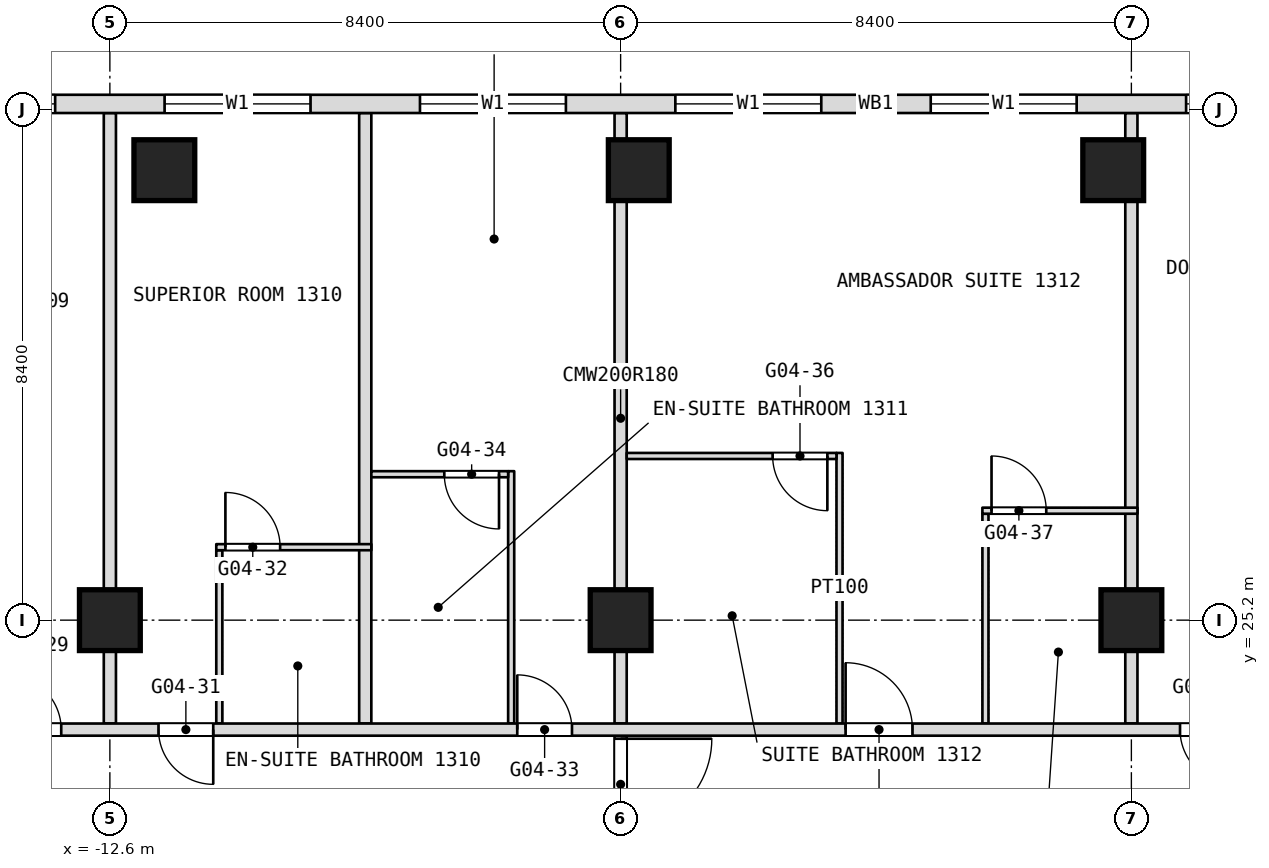
"""IFC4 building model, lengths in metres.
Left out: names, types, materials, properties, quantities, classifications, styles, units other than length and angle.
Written with IfcOpenShell. Run it as: python <this file> out.ifc"""

import sys

from ifc_helpers import new_model, si_unit, direction, frame, frame_2d, origin, origin_2d, place, context, subcontext, project, spatial, rectangle, extrude, element, fill, save


model = new_model("IFC4")
c1 = context("Model", 3, precision=1e-05, world=origin(), true_north=direction((0.0, 1.0)))
c2 = subcontext(c1, "Body", "Model", "MODEL_VIEW")
j1 = project(units=[si_unit("LENGTHUNIT", "METRE"), si_unit("PLANEANGLEUNIT", "RADIAN")], contexts=[c1])
p1 = place(None, origin())
s1 = spatial("IfcSite", under=j1, at=p1, CompositionType="ELEMENT")
p2 = place(p1, origin())
s2 = spatial("IfcBuilding", under=s1, at=p2, CompositionType="ELEMENT")
p3 = place(p2, frame((0.0, 0.0, 61.7)))
s3 = spatial("IfcBuildingStorey", under=s2, at=p3, CompositionType="ELEMENT", Elevation=61.7)
for number, where, z_axis, x_axis in (
    (1, (-12.6, 25.2, 0.0), (0.0, 0.0, 1.0), (1.0, 0.0, 0.0)),
    (2, (-4.2, 25.2, 0.0), (0.0, 0.0, 1.0), (1.0, 0.0, 0.0)),
    (3, (4.2, 25.2, 0.0), (0.0, 0.0, 1.0), (1.0, 0.0, 0.0)),
    (4, (-11.704, 32.6, 0.0), (0.0, 0.0, 1.0), (1.0, 0.0, 0.0)),
    (5, (-3.901, 32.6, 0.0), (0.0, 0.0, 1.0), (1.0, 0.0, 0.0)),
    (6, (3.901, 32.6, 0.0), (0.0, 0.0, 1.0), (1.0, 0.0, 0.0)),
):
    element("IfcColumn", number, at=place(p3, frame(where, z_axis=z_axis, x_axis=x_axis)), inside=s3, PredefinedType="COLUMN", context=c2, shape_type="SweptSolid", body=[
        extrude(rectangle(XDim=1.0, YDim=1.0, at=origin_2d()), origin(), (0.0, 0.0, 1.0), 3.6),
    ])
p4 = place(p3, frame((4.2, 23.5, 0.0), z_axis=(0.0, 0.0, 1.0), x_axis=(0.0, 1.0, 0.0)))
e7 = element("IfcWall", 7, at=p4, inside=s3, PredefinedType="PARTITIONING", context=c2, shape_type="SweptSolid", body=[
    extrude(rectangle(XDim=10.04, YDim=0.2, at=frame_2d((5.02, 0.0))), origin(), (0.0, 0.0, 1.0), 3.34),
])
p5 = place(p3, frame((1.8, 23.5, 0.0), z_axis=(0.0, 0.0, 1.0), x_axis=(0.0, 1.0, 0.0)))
e8 = element("IfcWall", 8, at=p5, inside=s3, PredefinedType="PARTITIONING", context=c2, shape_type="SweptSolid", body=[
    extrude(rectangle(XDim=3.45, YDim=0.1, at=frame_2d((1.725, 0.0))), origin(), (0.0, 0.0, 1.0), 3.34),
])
p6 = place(p3, frame((-0.6, 23.5, 0.0), z_axis=(0.0, 0.0, 1.0), x_axis=(0.0, 1.0, 0.0)))
e9 = element("IfcWall", 9, at=p6, inside=s3, PredefinedType="PARTITIONING", context=c2, shape_type="SweptSolid", body=[
    extrude(rectangle(XDim=4.45, YDim=0.1, at=frame_2d((2.225, 0.0))), origin(), (0.0, 0.0, 1.0), 3.34),
])
p7 = place(p3, frame((-4.2, 16.8, 0.0), z_axis=(0.0, 0.0, 1.0), x_axis=(0.0, 1.0, 0.0)))
e10 = element("IfcWall", 10, at=p7, inside=s3, PredefinedType="PARTITIONING", context=c2, shape_type="SweptSolid", body=[
    extrude(rectangle(XDim=6.7, YDim=0.2, at=frame_2d((3.35, 0.0))), origin(), (0.0, 0.0, 1.0), 3.34),
])
p8 = place(p7, frame((0.15, 0.0, 0.0)))
e11 = element("IfcOpeningElement", 11, at=p8, cuts=e10, PredefinedType="OPENING", context=c2, shape_type="SweptSolid", body=[
    extrude(rectangle(XDim=1.5, YDim=2.1, at=frame_2d((0.75, 1.05))), frame((0.0, 0.1, 0.0), z_axis=(0.0, -1.0, 0.0), x_axis=(1.0, 0.0, 0.0)), (0.0, 0.0, 1.0), 0.2),
])
p9 = place(p7, frame((4.95, 0.0, 0.0)))
e12 = element("IfcOpeningElement", 12, at=p9, cuts=e10, PredefinedType="OPENING", context=c2, shape_type="SweptSolid", body=[
    extrude(rectangle(XDim=1.5, YDim=2.1, at=frame_2d((0.75, 1.05))), frame((0.0, 0.1, 0.0), z_axis=(0.0, -1.0, 0.0), x_axis=(1.0, 0.0, 0.0)), (0.0, 0.0, 1.0), 0.2),
])
p10 = place(p3, frame((-4.2, 23.5, 0.0), z_axis=(0.0, 0.0, 1.0), x_axis=(0.0, 1.0, 0.0)))
e13 = element("IfcWall", 13, at=p10, inside=s3, PredefinedType="PARTITIONING", context=c2, shape_type="SweptSolid", body=[
    extrude(rectangle(XDim=10.04, YDim=0.2, at=frame_2d((5.02, 0.0))), origin(), (0.0, 0.0, 1.0), 3.34),
])
p11 = place(p3, frame((-6.0, 23.5, 0.0), z_axis=(0.0, 0.0, 1.0), x_axis=(0.0, 1.0, 0.0)))
e14 = element("IfcWall", 14, at=p11, inside=s3, PredefinedType="PARTITIONING", context=c2, shape_type="SweptSolid", body=[
    extrude(rectangle(XDim=4.15, YDim=0.1, at=frame_2d((2.075, 0.0))), origin(), (0.0, 0.0, 1.0), 3.34),
])
p12 = place(p3, frame((-8.4, 23.5, 0.0), z_axis=(0.0, 0.0, 1.0), x_axis=(0.0, 1.0, 0.0)))
e15 = element("IfcWall", 15, at=p12, inside=s3, PredefinedType="PARTITIONING", context=c2, shape_type="SweptSolid", body=[
    extrude(rectangle(XDim=10.04, YDim=0.2, at=frame_2d((5.02, 0.0))), origin(), (0.0, 0.0, 1.0), 3.34),
])
p13 = place(p3, frame((-10.8, 23.5, 0.0), z_axis=(0.0, 0.0, 1.0), x_axis=(0.0, 1.0, 0.0)))
e16 = element("IfcWall", 16, at=p13, inside=s3, PredefinedType="PARTITIONING", context=c2, shape_type="SweptSolid", body=[
    extrude(rectangle(XDim=2.85, YDim=0.1, at=frame_2d((1.425, 0.0))), origin(), (0.0, 0.0, 1.0), 3.34),
])
p14 = place(p3, frame((-12.6, 23.5, 0.0), z_axis=(0.0, 0.0, 1.0), x_axis=(0.0, 1.0, 0.0)))
e17 = element("IfcWall", 17, at=p14, inside=s3, PredefinedType="PARTITIONING", context=c2, shape_type="SweptSolid", body=[
    extrude(rectangle(XDim=10.04, YDim=0.2, at=frame_2d((5.02, 0.0))), origin(), (0.0, 0.0, 1.0), 3.34),
])
p15 = place(p3, frame((-16.7, 23.4, 0.0), z_axis=(0.0, 0.0, 1.0), x_axis=(1.0, 0.0, 0.0)))
e18 = element("IfcWall", 18, at=p15, inside=s3, PredefinedType="PARTITIONING", context=c2, shape_type="SweptSolid", body=[
    extrude(rectangle(XDim=23.4, YDim=0.2, at=frame_2d((11.7, 0.0))), origin(), (0.0, 0.0, 1.0), 3.34),
])
p16 = place(p15, frame((2.4, 0.0, 0.0)))
e19 = element("IfcOpeningElement", 19, at=p16, cuts=e18, PredefinedType="OPENING", context=c2, shape_type="SweptSolid", body=[
    extrude(rectangle(XDim=0.9, YDim=2.1, at=frame_2d((0.45, 1.05))), frame((0.0, 0.1, 0.0), z_axis=(0.0, -1.0, 0.0), x_axis=(1.0, 0.0, 0.0)), (0.0, 0.0, 1.0), 0.2),
])
p17 = place(p15, frame((4.9, 0.0, 0.0)))
e20 = element("IfcOpeningElement", 20, at=p17, cuts=e18, PredefinedType="OPENING", context=c2, shape_type="SweptSolid", body=[
    extrude(rectangle(XDim=0.9, YDim=2.1, at=frame_2d((0.45, 1.05))), frame((0.0, 0.1, 0.0), z_axis=(0.0, -1.0, 0.0), x_axis=(1.0, 0.0, 0.0)), (0.0, 0.0, 1.0), 0.2),
])
p18 = place(p15, frame((10.8, 0.0, 0.0)))
e21 = element("IfcOpeningElement", 21, at=p18, cuts=e18, PredefinedType="OPENING", context=c2, shape_type="SweptSolid", body=[
    extrude(rectangle(XDim=0.9, YDim=2.1, at=frame_2d((0.45, 1.05))), frame((0.0, 0.1, 0.0), z_axis=(0.0, -1.0, 0.0), x_axis=(1.0, 0.0, 0.0)), (0.0, 0.0, 1.0), 0.2),
])
p19 = place(p15, frame((16.2, 0.0, 0.0)))
e22 = element("IfcOpeningElement", 22, at=p19, cuts=e18, PredefinedType="OPENING", context=c2, shape_type="SweptSolid", body=[
    extrude(rectangle(XDim=1.1, YDim=2.1, at=frame_2d((0.55, 1.05))), frame((0.0, 0.1, 0.0), z_axis=(0.0, -1.0, 0.0), x_axis=(1.0, 0.0, 0.0)), (0.0, 0.0, 1.0), 0.2),
])
p20 = place(p15, frame((21.7, 0.0, 0.0)))
e23 = element("IfcOpeningElement", 23, at=p20, cuts=e18, PredefinedType="OPENING", context=c2, shape_type="SweptSolid", body=[
    extrude(rectangle(XDim=0.9, YDim=2.1, at=frame_2d((0.45, 1.05))), frame((0.0, 0.1, 0.0), z_axis=(0.0, -1.0, 0.0), x_axis=(1.0, 0.0, 0.0)), (0.0, 0.0, 1.0), 0.2),
])
p21 = place(p3, frame((-10.85, 26.4, 0.0), z_axis=(0.0, 0.0, 1.0), x_axis=(1.0, 0.0, 0.0)))
e24 = element("IfcWall", 24, at=p21, inside=s3, PredefinedType="PARTITIONING", context=c2, shape_type="SweptSolid", body=[
    extrude(rectangle(XDim=2.55, YDim=0.1, at=frame_2d((1.275, 0.0))), origin(), (0.0, 0.0, 1.0), 3.34),
])
p22 = place(p21, frame((0.15, 0.0, 0.0)))
e25 = element("IfcOpeningElement", 25, at=p22, cuts=e24, PredefinedType="OPENING", context=c2, shape_type="SweptSolid", body=[
    extrude(rectangle(XDim=0.9, YDim=2.1, at=frame_2d((0.45, 1.05))), frame((0.0, 0.05, 0.0), z_axis=(0.0, -1.0, 0.0), x_axis=(1.0, 0.0, 0.0)), (0.0, 0.0, 1.0), 0.1),
])
p23 = place(p3, frame((1.75, 27.0, 0.0), z_axis=(0.0, 0.0, 1.0), x_axis=(1.0, 0.0, 0.0)))
e26 = element("IfcWall", 26, at=p23, inside=s3, PredefinedType="PARTITIONING", context=c2, shape_type="SweptSolid", body=[
    extrude(rectangle(XDim=2.55, YDim=0.1, at=frame_2d((1.275, 0.0))), origin(), (0.0, 0.0, 1.0), 3.34),
])
p24 = place(p23, frame((0.15, 0.0, 0.0)))
e27 = element("IfcOpeningElement", 27, at=p24, cuts=e26, PredefinedType="OPENING", context=c2, shape_type="SweptSolid", body=[
    extrude(rectangle(XDim=0.9, YDim=2.1, at=frame_2d((0.45, 1.05))), frame((0.0, 0.05, 0.0), z_axis=(0.0, -1.0, 0.0), x_axis=(1.0, 0.0, 0.0)), (0.0, 0.0, 1.0), 0.1),
])
p25 = place(p3, frame((-8.3, 27.6, 0.0), z_axis=(0.0, 0.0, 1.0), x_axis=(1.0, 0.0, 0.0)))
e28 = element("IfcWall", 28, at=p25, inside=s3, PredefinedType="PARTITIONING", context=c2, shape_type="SweptSolid", body=[
    extrude(rectangle(XDim=2.25, YDim=0.1, at=frame_2d((1.125, 0.0))), origin(), (0.0, 0.0, 1.0), 3.34),
])
p26 = place(p25, frame((1.2, 0.0, 0.0)))
e29 = element("IfcOpeningElement", 29, at=p26, cuts=e28, PredefinedType="OPENING", context=c2, shape_type="SweptSolid", body=[
    extrude(rectangle(XDim=0.9, YDim=2.1, at=frame_2d((0.45, 1.05))), frame((0.0, 0.05, 0.0), z_axis=(0.0, -1.0, 0.0), x_axis=(1.0, 0.0, 0.0)), (0.0, 0.0, 1.0), 0.1),
])
p27 = place(p3, frame((-4.1, 27.9, 0.0), z_axis=(0.0, 0.0, 1.0), x_axis=(1.0, 0.0, 0.0)))
e30 = element("IfcWall", 30, at=p27, inside=s3, PredefinedType="PARTITIONING", context=c2, shape_type="SweptSolid", body=[
    extrude(rectangle(XDim=3.45, YDim=0.1, at=frame_2d((1.725, 0.0))), origin(), (0.0, 0.0, 1.0), 3.34),
])
p28 = place(p27, frame((2.4, 0.0, 0.0)))
e31 = element("IfcOpeningElement", 31, at=p28, cuts=e30, PredefinedType="OPENING", context=c2, shape_type="SweptSolid", body=[
    extrude(rectangle(XDim=0.9, YDim=2.1, at=frame_2d((0.45, 1.05))), frame((0.0, 0.05, 0.0), z_axis=(0.0, -1.0, 0.0), x_axis=(1.0, 0.0, 0.0)), (0.0, 0.0, 1.0), 0.1),
])
p29 = place(p3, frame((23.406, 33.69, 0.0), z_axis=(0.0, 0.0, 1.0), x_axis=(-1.0, 0.0, 0.0)))
e32 = element("IfcWall", 32, at=p29, inside=s3, PredefinedType="NOTDEFINED", context=c2, shape_type="SweptSolid", body=[
    extrude(rectangle(XDim=46.812, YDim=0.3, at=frame_2d((23.406, 0.0))), origin(), (0.0, 0.0, 1.0), 3.6),
])
p30 = place(p29, frame((2.186, 0.0, 0.9)))
e33 = element("IfcOpeningElement", 33, at=p30, cuts=e32, PredefinedType="OPENING", context=c2, shape_type="SweptSolid", body=[
    extrude(rectangle(XDim=2.4, YDim=2.1, at=frame_2d((1.2, 1.05))), frame((0.0, 0.15, 0.0), z_axis=(0.0, -1.0, 0.0), x_axis=(1.0, 0.0, 0.0)), (0.0, 0.0, 1.0), 0.3),
])
p31 = place(p29, frame((7.506, 0.0, 0.9)))
e34 = element("IfcOpeningElement", 34, at=p31, cuts=e32, PredefinedType="OPENING", context=c2, shape_type="SweptSolid", body=[
    extrude(rectangle(XDim=2.4, YDim=2.1, at=frame_2d((1.2, 1.05))), frame((0.0, 0.15, 0.0), z_axis=(0.0, -1.0, 0.0), x_axis=(1.0, 0.0, 0.0)), (0.0, 0.0, 1.0), 0.3),
])
p32 = place(p29, frame((11.706, 0.0, 0.9)))
e35 = element("IfcOpeningElement", 35, at=p32, cuts=e32, PredefinedType="OPENING", context=c2, shape_type="SweptSolid", body=[
    extrude(rectangle(XDim=2.4, YDim=2.1, at=frame_2d((1.2, 1.05))), frame((0.0, 0.15, 0.0), z_axis=(0.0, -1.0, 0.0), x_axis=(1.0, 0.0, 0.0)), (0.0, 0.0, 1.0), 0.3),
])
p33 = place(p29, frame((15.906, 0.0, 0.9)))
e36 = element("IfcOpeningElement", 36, at=p33, cuts=e32, PredefinedType="OPENING", context=c2, shape_type="SweptSolid", body=[
    extrude(rectangle(XDim=2.4, YDim=2.1, at=frame_2d((1.2, 1.05))), frame((0.0, 0.15, 0.0), z_axis=(0.0, -1.0, 0.0), x_axis=(1.0, 0.0, 0.0)), (0.0, 0.0, 1.0), 0.3),
])
p34 = place(p29, frame((20.106, 0.0, 0.9)))
e37 = element("IfcOpeningElement", 37, at=p34, cuts=e32, PredefinedType="OPENING", context=c2, shape_type="SweptSolid", body=[
    extrude(rectangle(XDim=2.4, YDim=2.1, at=frame_2d((1.2, 1.05))), frame((0.0, 0.15, 0.0), z_axis=(0.0, -1.0, 0.0), x_axis=(1.0, 0.0, 0.0)), (0.0, 0.0, 1.0), 0.3),
])
p35 = place(p29, frame((24.306, 0.0, 0.9)))
e38 = element("IfcOpeningElement", 38, at=p35, cuts=e32, PredefinedType="OPENING", context=c2, shape_type="SweptSolid", body=[
    extrude(rectangle(XDim=2.4, YDim=2.1, at=frame_2d((1.2, 1.05))), frame((0.0, 0.15, 0.0), z_axis=(0.0, -1.0, 0.0), x_axis=(1.0, 0.0, 0.0)), (0.0, 0.0, 1.0), 0.3),
])
p36 = place(p29, frame((28.506, 0.0, 0.9)))
e39 = element("IfcOpeningElement", 39, at=p36, cuts=e32, PredefinedType="OPENING", context=c2, shape_type="SweptSolid", body=[
    extrude(rectangle(XDim=2.4, YDim=2.1, at=frame_2d((1.2, 1.05))), frame((0.0, 0.15, 0.0), z_axis=(0.0, -1.0, 0.0), x_axis=(1.0, 0.0, 0.0)), (0.0, 0.0, 1.0), 0.3),
])
p37 = place(p29, frame((32.706, 0.0, 0.9)))
e40 = element("IfcOpeningElement", 40, at=p37, cuts=e32, PredefinedType="OPENING", context=c2, shape_type="SweptSolid", body=[
    extrude(rectangle(XDim=2.4, YDim=2.1, at=frame_2d((1.2, 1.05))), frame((0.0, 0.15, 0.0), z_axis=(0.0, -1.0, 0.0), x_axis=(1.0, 0.0, 0.0)), (0.0, 0.0, 1.0), 0.3),
])
p38 = place(p29, frame((36.906, 0.0, 0.9)))
e41 = element("IfcOpeningElement", 41, at=p38, cuts=e32, PredefinedType="OPENING", context=c2, shape_type="SweptSolid", body=[
    extrude(rectangle(XDim=2.4, YDim=2.1, at=frame_2d((1.2, 1.05))), frame((0.0, 0.15, 0.0), z_axis=(0.0, -1.0, 0.0), x_axis=(1.0, 0.0, 0.0)), (0.0, 0.0, 1.0), 0.3),
])
p39 = place(p29, frame((42.226, 0.0, 0.9)))
e42 = element("IfcOpeningElement", 42, at=p39, cuts=e32, PredefinedType="OPENING", context=c2, shape_type="SweptSolid", body=[
    extrude(rectangle(XDim=2.4, YDim=2.1, at=frame_2d((1.2, 1.05))), frame((0.0, 0.15, 0.0), z_axis=(0.0, -1.0, 0.0), x_axis=(1.0, 0.0, 0.0)), (0.0, 0.0, 1.0), 0.3),
])
p40 = place(p16, origin())
e43 = element("IfcDoor", 43, at=p40, inside=s3, OperationType="SINGLE_SWING_LEFT", PredefinedType="DOOR", context=c2, shape_type="SweptSolid", body=[
    extrude(rectangle(XDim=0.9, YDim=2.1, at=frame_2d((0.45, 1.05))), frame((0.0, 0.025, 0.0), z_axis=(0.0, -1.0, 0.0), x_axis=(1.0, 0.0, 0.0)), (0.0, 0.0, 1.0), 0.05),
])
fill(e19, e43)
p41 = place(p17, origin())
e44 = element("IfcDoor", 44, at=p41, inside=s3, OperationType="SINGLE_SWING_RIGHT", PredefinedType="DOOR", context=c2, shape_type="SweptSolid", body=[
    extrude(rectangle(XDim=0.9, YDim=2.1, at=frame_2d((0.45, 1.05))), frame((0.0, 0.025, 0.0), z_axis=(0.0, -1.0, 0.0), x_axis=(1.0, 0.0, 0.0)), (0.0, 0.0, 1.0), 0.05),
])
fill(e20, e44)
p42 = place(p18, origin())
e45 = element("IfcDoor", 45, at=p42, inside=s3, OperationType="SINGLE_SWING_LEFT", PredefinedType="DOOR", context=c2, shape_type="SweptSolid", body=[
    extrude(rectangle(XDim=0.9, YDim=2.1, at=frame_2d((0.45, 1.05))), frame((0.0, 0.025, 0.0), z_axis=(0.0, -1.0, 0.0), x_axis=(1.0, 0.0, 0.0)), (0.0, 0.0, 1.0), 0.05),
])
fill(e21, e45)
p43 = place(p19, origin())
e46 = element("IfcDoor", 46, at=p43, inside=s3, OperationType="SINGLE_SWING_LEFT", PredefinedType="DOOR", context=c2, shape_type="SweptSolid", body=[
    extrude(rectangle(XDim=1.1, YDim=2.1, at=frame_2d((0.55, 1.05))), frame((0.0, 0.025, 0.0), z_axis=(0.0, -1.0, 0.0), x_axis=(1.0, 0.0, 0.0)), (0.0, 0.0, 1.0), 0.05),
])
fill(e22, e46)
p44 = place(p20, origin())
e47 = element("IfcDoor", 47, at=p44, inside=s3, OperationType="SINGLE_SWING_RIGHT", PredefinedType="DOOR", context=c2, shape_type="SweptSolid", body=[
    extrude(rectangle(XDim=0.9, YDim=2.1, at=frame_2d((0.45, 1.05))), frame((0.0, 0.025, 0.0), z_axis=(0.0, -1.0, 0.0), x_axis=(1.0, 0.0, 0.0)), (0.0, 0.0, 1.0), 0.05),
])
fill(e23, e47)
p45 = place(p22, origin())
e48 = element("IfcDoor", 48, at=p45, inside=s3, OperationType="SINGLE_SWING_RIGHT", PredefinedType="DOOR", context=c2, shape_type="SweptSolid", body=[
    extrude(rectangle(XDim=0.9, YDim=2.1, at=frame_2d((0.45, 1.05))), frame((0.0, 0.025, 0.0), z_axis=(0.0, -1.0, 0.0), x_axis=(1.0, 0.0, 0.0)), (0.0, 0.0, 1.0), 0.05),
])
fill(e25, e48)
p46 = place(p24, origin())
e49 = element("IfcDoor", 49, at=p46, inside=s3, OperationType="SINGLE_SWING_RIGHT", PredefinedType="DOOR", context=c2, shape_type="SweptSolid", body=[
    extrude(rectangle(XDim=0.9, YDim=2.1, at=frame_2d((0.45, 1.05))), frame((0.0, 0.025, 0.0), z_axis=(0.0, -1.0, 0.0), x_axis=(1.0, 0.0, 0.0)), (0.0, 0.0, 1.0), 0.05),
])
fill(e27, e49)
p47 = place(p26, origin())
e50 = element("IfcDoor", 50, at=p47, inside=s3, OperationType="SINGLE_SWING_LEFT", PredefinedType="DOOR", context=c2, shape_type="SweptSolid", body=[
    extrude(rectangle(XDim=0.9, YDim=2.1, at=frame_2d((0.45, 1.05))), frame((0.0, 0.025, 0.0), z_axis=(0.0, -1.0, 0.0), x_axis=(1.0, 0.0, 0.0)), (0.0, 0.0, 1.0), 0.05),
])
fill(e29, e50)
p48 = place(p28, origin())
e51 = element("IfcDoor", 51, at=p48, inside=s3, OperationType="SINGLE_SWING_LEFT", PredefinedType="DOOR", context=c2, shape_type="SweptSolid", body=[
    extrude(rectangle(XDim=0.9, YDim=2.1, at=frame_2d((0.45, 1.05))), frame((0.0, 0.025, 0.0), z_axis=(0.0, -1.0, 0.0), x_axis=(1.0, 0.0, 0.0)), (0.0, 0.0, 1.0), 0.05),
])
fill(e31, e51)
p49 = place(p33, origin())
e52 = element("IfcWindow", 52, at=p49, inside=s3, PartitioningType="SINGLE_PANEL", PredefinedType="WINDOW", context=c2, shape_type="SweptSolid", body=[
    extrude(rectangle(XDim=2.4, YDim=2.1, at=frame_2d((1.2, 1.05))), frame((0.0, 0.03, 0.0), z_axis=(0.0, -1.0, 0.0), x_axis=(1.0, 0.0, 0.0)), (0.0, 0.0, 1.0), 0.06),
])
fill(e36, e52)
p50 = place(p34, origin())
e53 = element("IfcWindow", 53, at=p50, inside=s3, PartitioningType="SINGLE_PANEL", PredefinedType="WINDOW", context=c2, shape_type="SweptSolid", body=[
    extrude(rectangle(XDim=2.4, YDim=2.1, at=frame_2d((1.2, 1.05))), frame((0.0, 0.03, 0.0), z_axis=(0.0, -1.0, 0.0), x_axis=(1.0, 0.0, 0.0)), (0.0, 0.0, 1.0), 0.06),
])
fill(e37, e53)
p51 = place(p35, origin())
e54 = element("IfcWindow", 54, at=p51, inside=s3, PartitioningType="SINGLE_PANEL", PredefinedType="WINDOW", context=c2, shape_type="SweptSolid", body=[
    extrude(rectangle(XDim=2.4, YDim=2.1, at=frame_2d((1.2, 1.05))), frame((0.0, 0.03, 0.0), z_axis=(0.0, -1.0, 0.0), x_axis=(1.0, 0.0, 0.0)), (0.0, 0.0, 1.0), 0.06),
])
fill(e38, e54)
p52 = place(p36, origin())
e55 = element("IfcWindow", 55, at=p52, inside=s3, PartitioningType="SINGLE_PANEL", PredefinedType="WINDOW", context=c2, shape_type="SweptSolid", body=[
    extrude(rectangle(XDim=2.4, YDim=2.1, at=frame_2d((1.2, 1.05))), frame((0.0, 0.03, 0.0), z_axis=(0.0, -1.0, 0.0), x_axis=(1.0, 0.0, 0.0)), (0.0, 0.0, 1.0), 0.06),
])
fill(e39, e55)
p53 = place(p37, origin())
e56 = element("IfcWindow", 56, at=p53, inside=s3, PartitioningType="SINGLE_PANEL", PredefinedType="WINDOW", context=c2, shape_type="SweptSolid", body=[
    extrude(rectangle(XDim=2.4, YDim=2.1, at=frame_2d((1.2, 1.05))), frame((0.0, 0.03, 0.0), z_axis=(0.0, -1.0, 0.0), x_axis=(1.0, 0.0, 0.0)), (0.0, 0.0, 1.0), 0.06),
])
fill(e40, e56)
p54 = place(p38, origin())
e57 = element("IfcWindow", 57, at=p54, inside=s3, PartitioningType="SINGLE_PANEL", PredefinedType="WINDOW", context=c2, shape_type="SweptSolid", body=[
    extrude(rectangle(XDim=2.4, YDim=2.1, at=frame_2d((1.2, 1.05))), frame((0.0, 0.03, 0.0), z_axis=(0.0, -1.0, 0.0), x_axis=(1.0, 0.0, 0.0)), (0.0, 0.0, 1.0), 0.06),
])
fill(e41, e57)
p55 = place(p9, origin())
e58 = element("IfcDoor", 58, at=p55, inside=s3, OperationType="DOUBLE_DOOR_DOUBLE_SWING", PredefinedType="DOOR", context=c2, shape_type="SweptSolid", body=[
    extrude(rectangle(XDim=1.5, YDim=2.1, at=frame_2d((0.75, 1.05))), frame((0.0, 0.025, 0.0), z_axis=(0.0, -1.0, 0.0), x_axis=(1.0, 0.0, 0.0)), (0.0, 0.0, 1.0), 0.05),
])
fill(e12, e58)
save(model, sys.argv[1])
